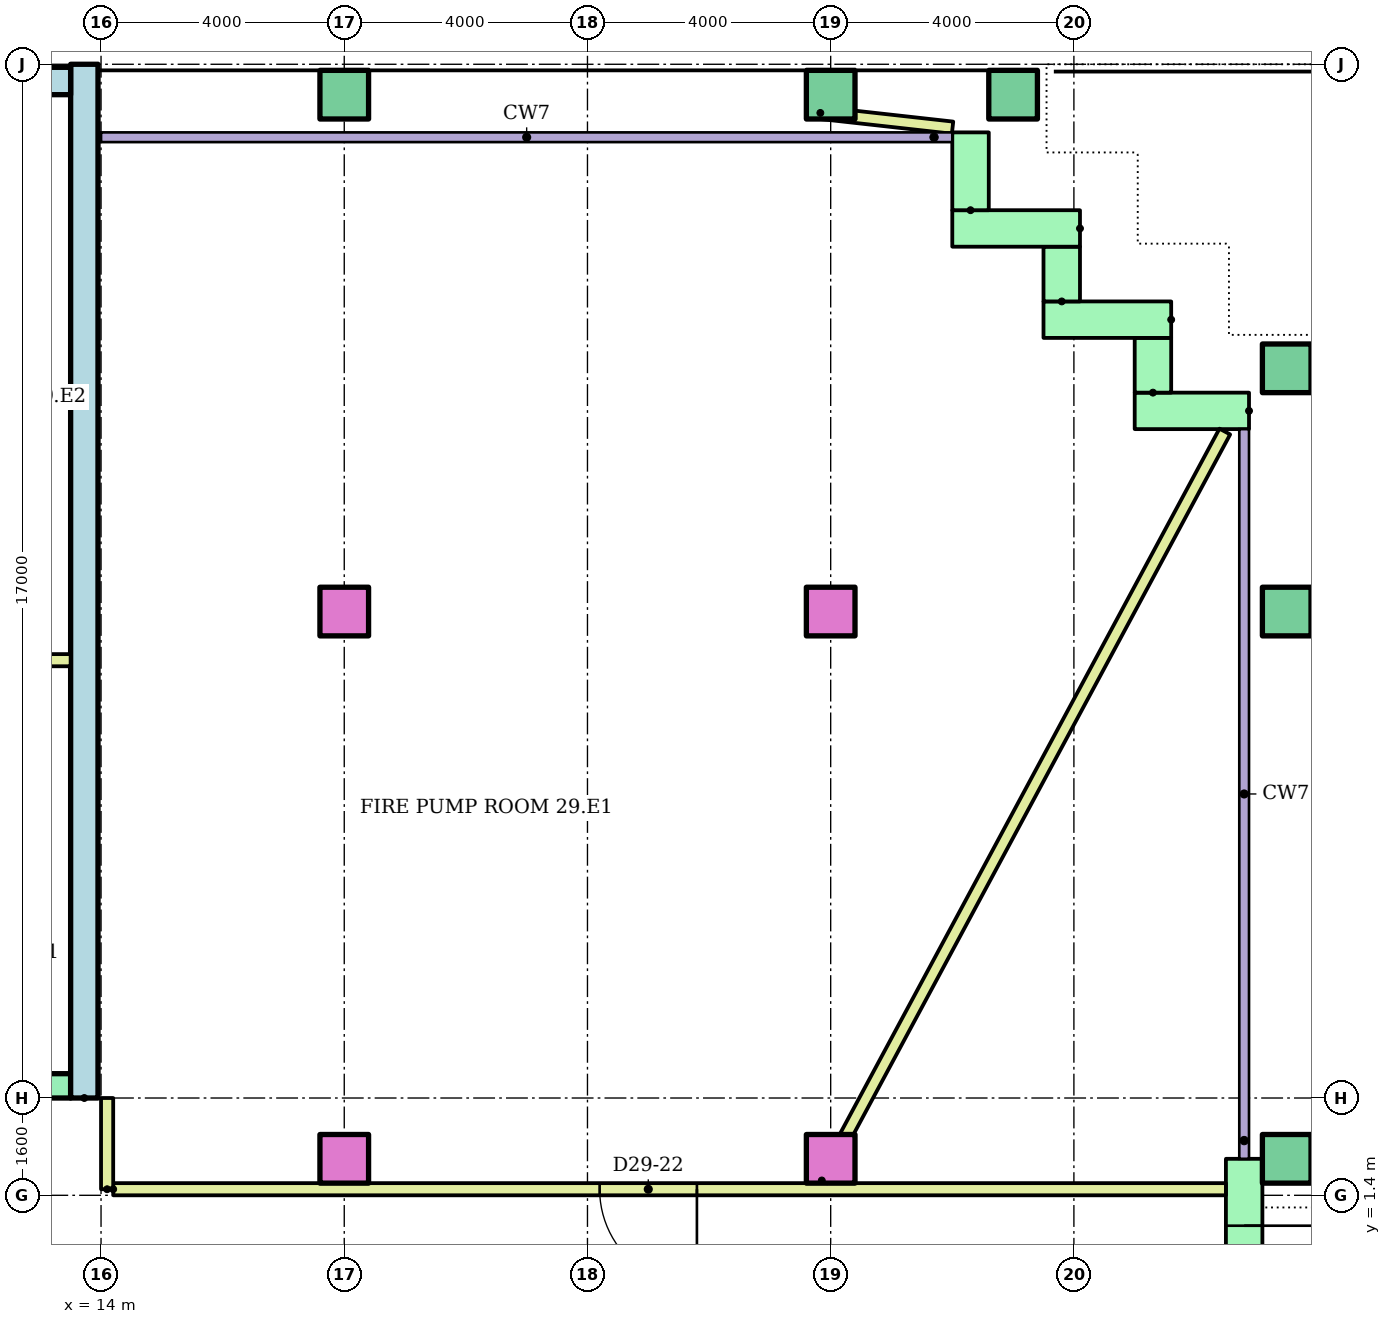
"""IFC4 building model, lengths in metres.
Left out: names, types, materials, properties, quantities, classifications, styles, units other than length and angle.
Written with IfcOpenShell. Run it as: python <this file> out.ifc"""

import sys

from ifc_helpers import new_model, si_unit, direction, frame, frame_2d, origin, origin_2d, place, context, subcontext, project, spatial, rectangle, hollow_rectangle, extrude, element, fill, save


model = new_model("IFC4")
c1 = context("Model", 3, precision=1e-05, world=origin(), true_north=direction((0.0, 1.0)))
c2 = subcontext(c1, "Body", "Model", "MODEL_VIEW")
j1 = project(units=[si_unit("LENGTHUNIT", "METRE"), si_unit("PLANEANGLEUNIT", "RADIAN")], contexts=[c1])
p1 = place(None, origin())
s1 = spatial("IfcSite", under=j1, at=p1, CompositionType="ELEMENT")
p2 = place(p1, origin())
s2 = spatial("IfcBuilding", under=s1, at=p2, CompositionType="ELEMENT")
p3 = place(p2, frame((0.0, 0.0, 115.9)))
s3 = spatial("IfcBuildingStorey", under=s2, at=p3, CompositionType="ELEMENT", Elevation=115.9)
for number, where in (
    (1, (18.0, 2.0, 0.0)),
    (2, (26.0, 2.0, 0.0)),
):
    element("IfcColumn", number, at=place(p3, frame(where)), inside=s3, PredefinedType="COLUMN", context=c2, shape_type="SweptSolid", body=[
        extrude(rectangle(XDim=0.8, YDim=0.8, at=origin_2d()), origin(), (0.0, 0.0, 1.0), 3.9),
    ])
p4 = place(p3, frame((33.5, 2.0, 0.0)))
e3 = element("IfcColumn", 3, at=p4, inside=s3, PredefinedType="COLUMN", context=c2, shape_type="SweptSolid", body=[
    extrude(hollow_rectangle(XDim=0.8, YDim=0.8, WallThickness=0.04, at=origin_2d()), origin(), (0.0, 0.0, 1.0), 3.9),
])
for number, where in (
    (4, (18.0, 11.0, 0.0)),
    (5, (26.0, 11.0, 0.0)),
):
    element("IfcColumn", number, at=place(p3, frame(where)), inside=s3, PredefinedType="COLUMN", context=c2, shape_type="SweptSolid", body=[
        extrude(rectangle(XDim=0.8, YDim=0.8, at=origin_2d()), origin(), (0.0, 0.0, 1.0), 3.9),
    ])
for number, where in (
    (6, (33.5, 11.0, 0.0)),
    (7, (33.5, 15.0, 0.0)),
    (8, (18.0, 19.5, 0.0)),
    (9, (26.0, 19.5, 0.0)),
    (10, (29.0, 19.5, 0.0)),
):
    element("IfcColumn", number, at=place(p3, frame(where)), inside=s3, PredefinedType="COLUMN", context=c2, shape_type="SweptSolid", body=[
        extrude(hollow_rectangle(XDim=0.8, YDim=0.8, WallThickness=0.04, at=origin_2d()), origin(), (0.0, 0.0, 1.0), 3.9),
    ])
p5 = place(p3, frame((32.88, 14.3, 0.0), z_axis=(0.0, 0.0, 1.0), x_axis=(-1.0, 0.0, 0.0)))
e11 = element("IfcWall", 11, at=p5, inside=s3, PredefinedType="STANDARD", context=c2, shape_type="SweptSolid", body=[
    extrude(rectangle(XDim=1.88, YDim=0.6, at=frame_2d((0.94, 0.0))), origin(), (0.0, 0.0, 1.0), 3.62),
])
p6 = place(p3, frame((31.3, 14.6, 0.0), z_axis=(0.0, 0.0, 1.0), x_axis=(0.0, 1.0, 0.0)))
e12 = element("IfcWall", 12, at=p6, inside=s3, PredefinedType="STANDARD", context=c2, shape_type="SweptSolid", body=[
    extrude(rectangle(XDim=0.9, YDim=0.6, at=frame_2d((0.45, 0.0))), origin(), (0.0, 0.0, 1.0), 3.62),
])
p7 = place(p3, frame((31.6, 15.8, 0.0), z_axis=(0.0, 0.0, 1.0), x_axis=(-1.0, 0.0, 0.0)))
e13 = element("IfcWall", 13, at=p7, inside=s3, PredefinedType="STANDARD", context=c2, shape_type="SweptSolid", body=[
    extrude(rectangle(XDim=2.1, YDim=0.6, at=frame_2d((1.05, 0.0))), origin(), (0.0, 0.0, 1.0), 3.62),
])
p8 = place(p3, frame((29.8, 16.1, 0.0), z_axis=(0.0, 0.0, 1.0), x_axis=(0.0, 1.0, 0.0)))
e14 = element("IfcWall", 14, at=p8, inside=s3, PredefinedType="STANDARD", context=c2, shape_type="SweptSolid", body=[
    extrude(rectangle(XDim=0.9, YDim=0.6, at=frame_2d((0.45, 0.0))), origin(), (0.0, 0.0, 1.0), 3.62),
])
p9 = place(p3, frame((30.1, 17.3, 0.0), z_axis=(0.0, 0.0, 1.0), x_axis=(-1.0, 0.0, 0.0)))
e15 = element("IfcWall", 15, at=p9, inside=s3, PredefinedType="STANDARD", context=c2, shape_type="SweptSolid", body=[
    extrude(rectangle(XDim=2.1, YDim=0.6, at=frame_2d((1.05, 0.0))), origin(), (0.0, 0.0, 1.0), 3.62),
])
p10 = place(p3, frame((28.3, 17.6, 0.0), z_axis=(0.0, 0.0, 1.0), x_axis=(0.0, 1.0, 0.0)))
e16 = element("IfcWall", 16, at=p10, inside=s3, PredefinedType="STANDARD", context=c2, shape_type="SweptSolid", body=[
    extrude(rectangle(XDim=1.28, YDim=0.6, at=frame_2d((0.64, 0.0))), origin(), (0.0, 0.0, 1.0), 3.62),
])
p11 = place(p3, frame((32.8, -2.0, 0.0), z_axis=(0.0, 0.0, 1.0), x_axis=(0.0, 1.0, 0.0)))
e17 = element("IfcWall", 17, at=p11, inside=s3, PredefinedType="STANDARD", context=c2, shape_type="SweptSolid", body=[
    extrude(rectangle(XDim=4.0, YDim=0.6, at=frame_2d((2.0, 0.0))), origin(), (0.0, 0.0, 1.0), 3.62),
])
p12 = place(p11, frame((1.1, 0.0, 0.0)))
e18 = element("IfcOpeningElement", 18, at=p12, cuts=e17, PredefinedType="OPENING", context=c2, shape_type="SweptSolid", body=[
    extrude(rectangle(XDim=1.8, YDim=2.1, at=frame_2d((0.9, 1.05))), frame((0.0, 0.31, 0.0), z_axis=(0.0, -1.0, 0.0), x_axis=(1.0, 0.0, 0.0)), (0.0, 0.0, 1.0), 0.62),
])
p13 = place(p3, frame((13.725, 3.0, 0.0), z_axis=(0.0, 0.0, 1.0), x_axis=(0.0, 1.0, 0.0)))
e19 = element("IfcWall", 19, at=p13, inside=s3, PredefinedType="SHEAR", context=c2, shape_type="SweptSolid", body=[
    extrude(rectangle(XDim=17.0, YDim=0.45, at=frame_2d((8.5, 0.0))), origin(), (0.0, 0.0, 1.0), 3.62),
])
p14 = place(p3, frame((-13.5, 19.725, 0.0)))
e20 = element("IfcWall", 20, at=p14, inside=s3, PredefinedType="SHEAR", context=c2, shape_type="SweptSolid", body=[
    extrude(rectangle(XDim=27.0, YDim=0.45, at=frame_2d((13.5, 0.0))), origin(), (0.0, 0.0, 1.0), 3.62),
])
p15 = place(p3, frame((-13.5, 3.2, 0.0)))
e21 = element("IfcWall", 21, at=p15, inside=s3, PredefinedType="SHEAR", context=c2, shape_type="SweptSolid", body=[
    extrude(rectangle(XDim=27.0, YDim=0.4, at=frame_2d((13.5, 0.0))), origin(), (0.0, 0.0, 1.0), 3.62),
])
p16 = place(p15, frame((6.861, 0.0, 0.0)))
e22 = element("IfcOpeningElement", 22, at=p16, cuts=e21, PredefinedType="OPENING", context=c2, shape_type="SweptSolid", body=[
    extrude(rectangle(XDim=1.1, YDim=2.1, at=frame_2d((0.55, 1.05))), frame((0.0, 0.21, 0.0), z_axis=(0.0, -1.0, 0.0), x_axis=(1.0, 0.0, 0.0)), (0.0, 0.0, 1.0), 0.42),
])
p17 = place(p15, frame((9.906, 0.0, 0.0)))
e23 = element("IfcOpeningElement", 23, at=p17, cuts=e21, PredefinedType="OPENING", context=c2, shape_type="SweptSolid", body=[
    extrude(rectangle(XDim=1.1, YDim=2.1, at=frame_2d((0.55, 1.05))), frame((0.0, 0.21, 0.0), z_axis=(0.0, -1.0, 0.0), x_axis=(1.0, 0.0, 0.0)), (0.0, 0.0, 1.0), 0.42),
])
p18 = place(p15, frame((15.994, 0.0, 0.0)))
e24 = element("IfcOpeningElement", 24, at=p18, cuts=e21, PredefinedType="OPENING", context=c2, shape_type="SweptSolid", body=[
    extrude(rectangle(XDim=1.1, YDim=2.1, at=frame_2d((0.55, 1.05))), frame((0.0, 0.21, 0.0), z_axis=(0.0, -1.0, 0.0), x_axis=(1.0, 0.0, 0.0)), (0.0, 0.0, 1.0), 0.42),
])
p19 = place(p15, frame((19.039, 0.0, 0.0)))
e25 = element("IfcOpeningElement", 25, at=p19, cuts=e21, PredefinedType="OPENING", context=c2, shape_type="SweptSolid", body=[
    extrude(rectangle(XDim=1.1, YDim=2.1, at=frame_2d((0.55, 1.05))), frame((0.0, 0.21, 0.0), z_axis=(0.0, -1.0, 0.0), x_axis=(1.0, 0.0, 0.0)), (0.0, 0.0, 1.0), 0.42),
])
p20 = place(p15, frame((12.6, 0.0, 0.0)))
e26 = element("IfcOpeningElement", 26, at=p20, cuts=e21, PredefinedType="OPENING", context=c2, shape_type="SweptSolid", body=[
    extrude(rectangle(XDim=1.8, YDim=2.1, at=frame_2d((0.9, 1.05))), frame((0.0, 0.21, 0.0), z_axis=(0.0, -1.0, 0.0), x_axis=(1.0, 0.0, 0.0)), (0.0, 0.0, 1.0), 0.42),
])
p21 = place(p3, frame((9.6, 10.2, 0.0)))
e27 = element("IfcWall", 27, at=p21, inside=s3, PredefinedType="PARTITIONING", context=c2, shape_type="SweptSolid", body=[
    extrude(rectangle(XDim=3.9, YDim=0.2, at=frame_2d((1.95, 0.0))), origin(), (0.0, 0.0, 1.0), 3.62),
])
p22 = place(p3, frame((14.2, 1.5, 0.0)))
e28 = element("IfcWall", 28, at=p22, inside=s3, PredefinedType="PARTITIONING", context=c2, shape_type="SweptSolid", body=[
    extrude(rectangle(XDim=18.3, YDim=0.2, at=frame_2d((9.15, 0.0))), origin(), (0.0, 0.0, 1.0), 3.62),
])
p23 = place(p22, frame((8.0, 0.0, 0.0)))
e29 = element("IfcOpeningElement", 29, at=p23, cuts=e28, PredefinedType="OPENING", context=c2, shape_type="SweptSolid", body=[
    extrude(rectangle(XDim=1.6, YDim=2.4, at=frame_2d((0.8, 1.2))), frame((0.0, 0.11, 0.0), z_axis=(0.0, -1.0, 0.0), x_axis=(1.0, 0.0, 0.0)), (0.0, 0.0, 1.0), 0.22),
])
p24 = place(p3, frame((14.1, 1.5, 0.0), z_axis=(0.0, 0.0, 1.0), x_axis=(0.0, 1.0, 0.0)))
e30 = element("IfcWall", 30, at=p24, inside=s3, PredefinedType="PARTITIONING", context=c2, shape_type="SweptSolid", body=[
    extrude(rectangle(XDim=1.5, YDim=0.2, at=frame_2d((0.75, 0.0))), origin(), (0.0, 0.0, 1.0), 3.62),
])
p25 = place(p3, frame((25.854, 1.644, 0.0), z_axis=(0.0, 0.0, 1.0), x_axis=(0.473899953107, 0.880578692932, 0.0)))
e31 = element("IfcWall", 31, at=p25, inside=s3, PredefinedType="PARTITIONING", context=c2, shape_type="SweptSolid", body=[
    extrude(rectangle(XDim=13.986, YDim=0.2, at=frame_2d((6.993, 0.0))), origin(), (0.0, 0.0, 1.0), 3.62),
])
p26 = place(p3, frame((25.83, 19.2, 0.0), z_axis=(0.0, 0.0, 1.0), x_axis=(0.993841474797, -0.110811204185, 0.0)))
e32 = element("IfcWall", 32, at=p26, inside=s3, PredefinedType="PARTITIONING", context=c2, shape_type="SweptSolid", body=[
    extrude(rectangle(XDim=2.188, YDim=0.2, at=frame_2d((1.094, 0.0))), origin(), (0.0, 0.0, 1.0), 3.62),
])
p27 = place(p12, frame((1.8, 0.0, 0.0), z_axis=(0.0, 0.0, 1.0), x_axis=(-1.0, 0.0, 0.0)))
e33 = element("IfcDoor", 33, at=p27, inside=s3, OperationType="DOUBLE_DOOR_SINGLE_SWING", PredefinedType="DOOR", context=c2, shape_type="SweptSolid", body=[
    extrude(rectangle(XDim=1.8, YDim=2.1, at=frame_2d((0.9, 1.05))), frame((0.0, 0.025, 0.0), z_axis=(0.0, -1.0, 0.0), x_axis=(1.0, 0.0, 0.0)), (0.0, 0.0, 1.0), 0.05),
])
fill(e18, e33)
p28 = place(p23, frame((1.6, 0.0, 0.0), z_axis=(0.0, 0.0, 1.0), x_axis=(-1.0, 0.0, 0.0)))
e34 = element("IfcDoor", 34, at=p28, inside=s3, OperationType="DOUBLE_DOOR_SINGLE_SWING", PredefinedType="DOOR", context=c2, shape_type="SweptSolid", body=[
    extrude(rectangle(XDim=1.6, YDim=2.4, at=frame_2d((0.8, 1.2))), frame((0.0, 0.025, 0.0), z_axis=(0.0, -1.0, 0.0), x_axis=(1.0, 0.0, 0.0)), (0.0, 0.0, 1.0), 0.05),
])
fill(e29, e34)
save(model, sys.argv[1])
